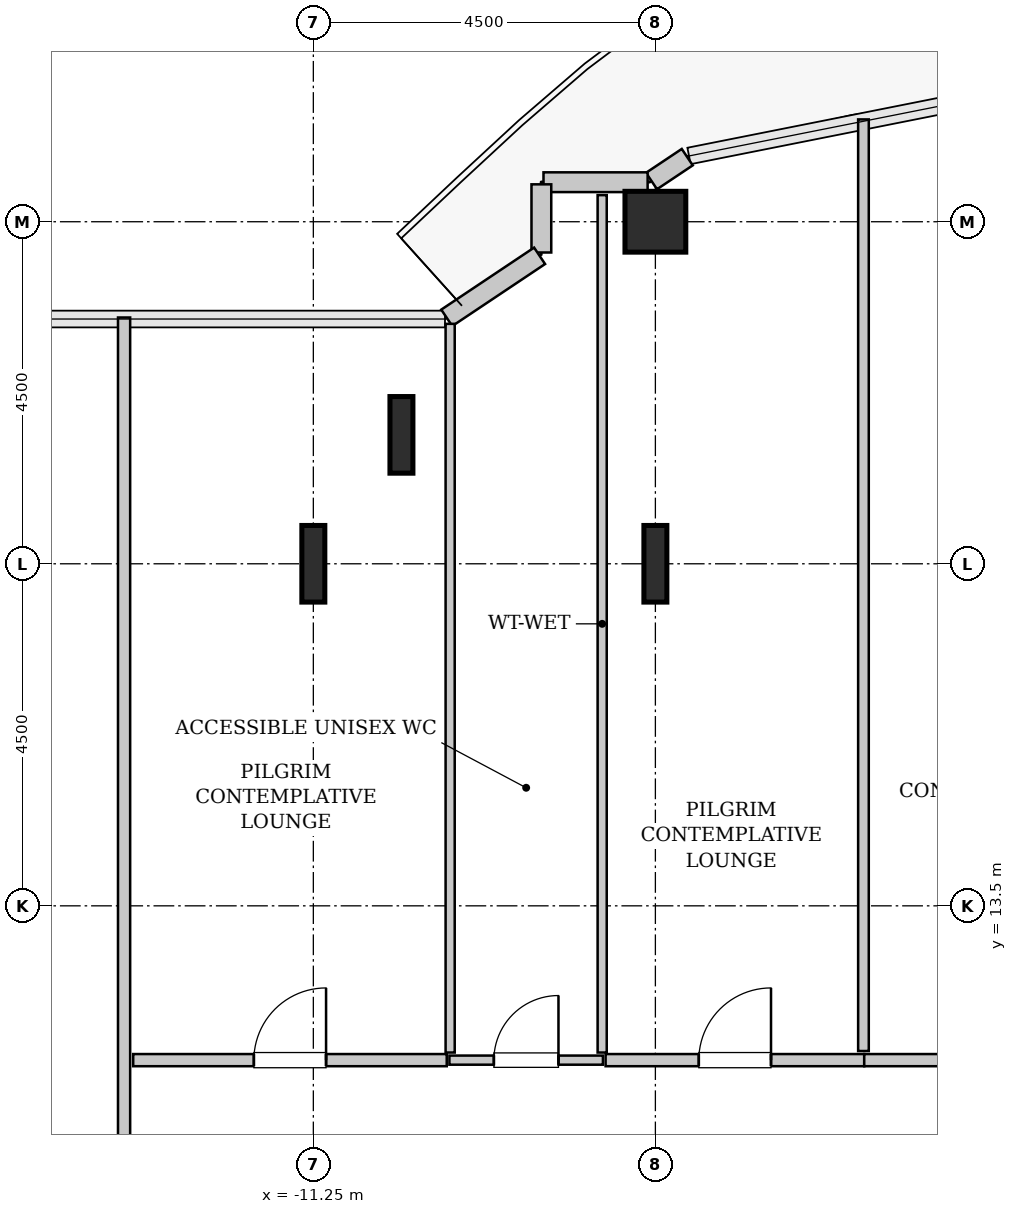
"""IFC4 building model, lengths in metres.
Left out: names, types, materials, properties, quantities, classifications, styles, units other than length and angle.
Written with IfcOpenShell. Run it as: python <this file> out.ifc"""

import sys

from ifc_helpers import new_model, si_unit, direction, frame, frame_2d, origin, origin_2d, place, context, subcontext, project, spatial, rectangle, hollow_rectangle, i_section, extrude, source, transform, mapped, element, fill, save


model = new_model("IFC4")
c1 = context("Model", 3, precision=1e-05, world=origin(), true_north=direction((0.0, 1.0)))
c2 = subcontext(c1, "Body", "Model", "MODEL_VIEW")
j1 = project(units=[si_unit("LENGTHUNIT", "METRE"), si_unit("PLANEANGLEUNIT", "RADIAN")], contexts=[c1])
p1 = place(None, origin())
s1 = spatial("IfcSite", under=j1, at=p1, CompositionType="ELEMENT")
p2 = place(p1, origin())
s2 = spatial("IfcBuilding", under=s1, at=p2, CompositionType="ELEMENT")
p3 = place(p2, frame((0.0, 0.0, 113.6)))
s3 = spatial("IfcBuildingStorey", under=s2, at=p3, CompositionType="ELEMENT", Elevation=113.6)
m1 = source(origin(), c2, "Body", "SweptSolid", [
    extrude(i_section(OverallWidth=0.302, OverallDepth=1.008, WebThickness=0.021, FlangeThickness=0.04, FilletRadius=0.03, at=origin_2d()), origin(), (0.0, 0.0, 1.0), 3.8),
])
for number, where, z_axis, x_axis in (
    (1, (-11.25, 18.0, 0.0), (0.0, 0.0, 1.0), (1.0, 0.0, 0.0)),
    (2, (-10.091, 19.696, 0.0), (0.0, 0.0, 1.0), (1.0, 0.0, 0.0)),
    (3, (-6.75, 18.0, 0.0), (0.0, 0.0, 1.0), (1.0, 0.0, 0.0)),
):
    element("IfcColumn", number, at=place(p3, frame(where, z_axis=z_axis, x_axis=x_axis)), inside=s3, PredefinedType="COLUMN", context=c2, shape_type="MappedRepresentation", body=[
        mapped(m1, transform((0.0, 0.0, 0.0), x_axis=(1.0, 0.0, 0.0), y_axis=(0.0, 1.0, 0.0), z_axis=(0.0, 0.0, 1.0), scale=1.0)),
    ])
m2 = source(origin(), c2, "Body", "SweptSolid", [
    extrude(hollow_rectangle(XDim=0.8, YDim=0.8, WallThickness=0.04, InnerFilletRadius=0.04, OuterFilletRadius=0.08, at=origin_2d()), origin(), (0.0, 0.0, 1.0), 3.8),
])
p4 = place(p3, frame((-6.75, 22.5, 0.0), z_axis=(0.0, 0.0, 1.0), x_axis=(1.0, 0.0, 0.0)))
e4 = element("IfcColumn", 4, at=p4, inside=s3, PredefinedType="COLUMN", context=c2, shape_type="MappedRepresentation", body=[
    mapped(m2, transform((0.0, 0.0, 0.0), x_axis=(1.0, 0.0, 0.0), y_axis=(0.0, 1.0, 0.0), z_axis=(0.0, 0.0, 1.0), scale=1.0)),
])
m3 = source(origin(), c2, "Body", "SweptSolid", [
    extrude(rectangle(XDim=0.565, YDim=0.26, at=frame_2d((0.283, 0.0))), origin(), (0.0, 0.0, 1.0), 3.55),
])
p5 = place(p3, frame((-6.331, 23.35, 0.0), z_axis=(0.0, 0.0, 1.0), x_axis=(-0.831651492666, -0.555297933317, 0.0)))
e5 = element("IfcWall", 5, at=p5, inside=s3, PredefinedType="SOLIDWALL", context=c2, shape_type="MappedRepresentation", body=[
    mapped(m3, transform((0.0, 0.0, 0.0), x_axis=(1.0, 0.0, 0.0), y_axis=(0.0, 1.0, 0.0), z_axis=(0.0, 0.0, 1.0), scale=1.0)),
])
m4 = source(origin(), c2, "Body", "SweptSolid", [
    extrude(rectangle(XDim=1.37, YDim=0.26, at=frame_2d((0.685, 0.0))), origin(), (0.0, 0.0, 1.0), 3.55),
])
p6 = place(p3, frame((-6.852, 23.02, 0.0), z_axis=(0.0, 0.0, 1.0), x_axis=(-1.0, 0.0, 0.0)))
e6 = element("IfcWall", 6, at=p6, inside=s3, PredefinedType="SOLIDWALL", context=c2, shape_type="MappedRepresentation", body=[
    mapped(m4, transform((0.0, 0.0, 0.0), x_axis=(1.0, 0.0, 0.0), y_axis=(0.0, 1.0, 0.0), z_axis=(0.0, 0.0, 1.0), scale=1.0)),
])
m5 = source(origin(), c2, "Body", "SweptSolid", [
    extrude(rectangle(XDim=0.897, YDim=0.26, at=frame_2d((0.448, 0.0))), origin(), (0.0, 0.0, 1.0), 3.55),
])
p7 = place(p3, frame((-8.25, 22.992, 0.0), z_axis=(0.0, 0.0, 1.0), x_axis=(0.0, -1.0, 0.0)))
e7 = element("IfcWall", 7, at=p7, inside=s3, PredefinedType="SOLIDWALL", context=c2, shape_type="MappedRepresentation", body=[
    mapped(m5, transform((0.0, 0.0, 0.0), x_axis=(1.0, 0.0, 0.0), y_axis=(0.0, 1.0, 0.0), z_axis=(0.0, 0.0, 1.0), scale=1.0)),
])
m6 = source(origin(), c2, "Body", "SweptSolid", [
    extrude(rectangle(XDim=1.469, YDim=0.26, at=frame_2d((0.734, 0.0))), origin(), (0.0, 0.0, 1.0), 3.55),
])
p8 = place(p3, frame((-8.273, 22.052, 0.0), z_axis=(0.0, 0.0, 1.0), x_axis=(-0.831461760506, -0.555581983884, 0.0)))
e8 = element("IfcWall", 8, at=p8, inside=s3, PredefinedType="SOLIDWALL", context=c2, shape_type="MappedRepresentation", body=[
    mapped(m6, transform((0.0, 0.0, 0.0), x_axis=(1.0, 0.0, 0.0), y_axis=(0.0, 1.0, 0.0), z_axis=(0.0, 0.0, 1.0), scale=1.0)),
])
m7 = source(origin(), c2, "Body", "SweptSolid", [
    extrude(rectangle(XDim=2.02, YDim=0.12, at=frame_2d((1.01, 0.0))), origin(), (0.0, 0.0, 1.0), 3.535),
])
p9 = place(p3, frame((-9.46, 11.47, 0.0), z_axis=(0.0, 0.0, 1.0), x_axis=(1.0, 0.0, 0.0)))
e9 = element("IfcWall", 9, at=p9, inside=s3, PredefinedType="PLUMBINGWALL", context=c2, shape_type="MappedRepresentation", body=[
    mapped(m7, transform((0.0, 0.0, 0.0), x_axis=(1.0, 0.0, 0.0), y_axis=(0.0, 1.0, 0.0), z_axis=(0.0, 0.0, 1.0), scale=1.0)),
])
p10 = place(p9, frame((0.585, 0.0, 0.0)))
e10 = element("IfcOpeningElement", 10, at=p10, cuts=e9, PredefinedType="OPENING", context=c2, shape_type="SweptSolid", body=[
    extrude(rectangle(XDim=0.85, YDim=2.1, at=frame_2d((0.425, 1.05))), frame((0.0, 0.07, 0.0), z_axis=(0.0, -1.0, 0.0), x_axis=(1.0, 0.0, 0.0)), (0.0, 0.0, 1.0), 0.14),
])
m8 = source(origin(), c2, "Body", "SweptSolid", [
    extrude(rectangle(XDim=11.28, YDim=0.12, at=frame_2d((5.64, 0.0))), origin(), (0.0, 0.0, 1.0), 3.535),
])
p11 = place(p3, frame((-7.45, 11.57, 0.0), z_axis=(0.0, 0.0, 1.0), x_axis=(0.0, 1.0, 0.0)))
e11 = element("IfcWall", 11, at=p11, inside=s3, PredefinedType="PLUMBINGWALL", context=c2, shape_type="MappedRepresentation", body=[
    mapped(m8, transform((0.0, 0.0, 0.0), x_axis=(1.0, 0.0, 0.0), y_axis=(0.0, 1.0, 0.0), z_axis=(0.0, 0.0, 1.0), scale=1.0)),
])
m9 = source(origin(), c2, "Body", "SweptSolid", [
    extrude(rectangle(XDim=9.587, YDim=0.12, at=frame_2d((4.793, 0.0))), origin(), (0.0, 0.0, 1.0), 3.535),
])
p12 = place(p3, frame((-9.45, 11.57, 0.0), z_axis=(0.0, 0.0, 1.0), x_axis=(0.0, 1.0, 0.0)))
e12 = element("IfcWall", 12, at=p12, inside=s3, PredefinedType="PLUMBINGWALL", context=c2, shape_type="MappedRepresentation", body=[
    mapped(m9, transform((0.0, 0.0, 0.0), x_axis=(1.0, 0.0, 0.0), y_axis=(0.0, 1.0, 0.0), z_axis=(0.0, 0.0, 1.0), scale=1.0)),
])
m10 = source(origin(), c2, "Body", "SweptSolid", [
    extrude(rectangle(XDim=12.745, YDim=0.16, at=frame_2d((6.373, 0.0))), origin(), (0.0, 0.0, 1.0), 3.535),
])
p13 = place(p3, frame((-13.74, 8.495, 0.0), z_axis=(0.0, 0.0, 1.0), x_axis=(0.0, 1.0, 0.0)))
e13 = element("IfcWall", 13, at=p13, inside=s3, PredefinedType="PARTITIONING", context=c2, shape_type="MappedRepresentation", body=[
    mapped(m10, transform((0.0, 0.0, 0.0), x_axis=(1.0, 0.0, 0.0), y_axis=(0.0, 1.0, 0.0), z_axis=(0.0, 0.0, 1.0), scale=1.0)),
])
p14 = place(p13, frame((1.032, 0.0, 0.0)))
e14 = element("IfcOpeningElement", 14, at=p14, cuts=e13, PredefinedType="OPENING", context=c2, shape_type="SweptSolid", body=[
    extrude(rectangle(XDim=0.95, YDim=2.1, at=frame_2d((0.475, 1.05))), frame((0.0, 0.09, 0.0), z_axis=(0.0, -1.0, 0.0), x_axis=(1.0, 0.0, 0.0)), (0.0, 0.0, 1.0), 0.18),
])
m11 = source(origin(), c2, "Body", "SweptSolid", [
    extrude(rectangle(XDim=4.125, YDim=0.16, at=frame_2d((2.062, 0.0))), origin(), (0.0, 0.0, 1.0), 3.535),
])
p15 = place(p3, frame((-13.62, 11.47, 0.0), z_axis=(0.0, 0.0, 1.0), x_axis=(1.0, 0.0, 0.0)))
e15 = element("IfcWall", 15, at=p15, inside=s3, PredefinedType="PARTITIONING", context=c2, shape_type="MappedRepresentation", body=[
    mapped(m11, transform((0.0, 0.0, 0.0), x_axis=(1.0, 0.0, 0.0), y_axis=(0.0, 1.0, 0.0), z_axis=(0.0, 0.0, 1.0), scale=1.0)),
])
p16 = place(p15, frame((1.587, 0.0, 0.0)))
e16 = element("IfcOpeningElement", 16, at=p16, cuts=e15, PredefinedType="OPENING", context=c2, shape_type="SweptSolid", body=[
    extrude(rectangle(XDim=0.95, YDim=2.1, at=frame_2d((0.475, 1.05))), frame((0.0, 0.09, 0.0), z_axis=(0.0, -1.0, 0.0), x_axis=(1.0, 0.0, 0.0)), (0.0, 0.0, 1.0), 0.18),
])
m12 = source(origin(), c2, "Body", "SweptSolid", [
    extrude(rectangle(XDim=3.403, YDim=0.16, at=frame_2d((1.701, 0.0))), origin(), (0.0, 0.0, 1.0), 3.535),
])
p17 = place(p3, frame((-7.405, 11.47, 0.0), z_axis=(0.0, 0.0, 1.0), x_axis=(1.0, 0.0, 0.0)))
e17 = element("IfcWall", 17, at=p17, inside=s3, PredefinedType="PARTITIONING", context=c2, shape_type="MappedRepresentation", body=[
    mapped(m12, transform((0.0, 0.0, 0.0), x_axis=(1.0, 0.0, 0.0), y_axis=(0.0, 1.0, 0.0), z_axis=(0.0, 0.0, 1.0), scale=1.0)),
])
p18 = place(p17, frame((1.226, 0.0, 0.0)))
e18 = element("IfcOpeningElement", 18, at=p18, cuts=e17, PredefinedType="OPENING", context=c2, shape_type="SweptSolid", body=[
    extrude(rectangle(XDim=0.95, YDim=2.1, at=frame_2d((0.475, 1.05))), frame((0.0, 0.09, 0.0), z_axis=(0.0, -1.0, 0.0), x_axis=(1.0, 0.0, 0.0)), (0.0, 0.0, 1.0), 0.18),
])
m13 = source(origin(), c2, "Body", "SweptSolid", [
    extrude(rectangle(XDim=12.256, YDim=0.14, at=frame_2d((6.128, 0.0))), origin(), (0.0, 0.0, 1.0), 3.535),
])
p19 = place(p3, frame((-4.012, 11.59, 0.0), z_axis=(0.0, 0.0, 1.0), x_axis=(0.0, 1.0, 0.0)))
e19 = element("IfcWall", 19, at=p19, inside=s3, PredefinedType="PARTITIONING", context=c2, shape_type="MappedRepresentation", body=[
    mapped(m13, transform((0.0, 0.0, 0.0), x_axis=(1.0, 0.0, 0.0), y_axis=(0.0, 1.0, 0.0), z_axis=(0.0, 0.0, 1.0), scale=1.0)),
])
m14 = source(origin(), c2, "Body", "SweptSolid", [
    extrude(rectangle(XDim=3.402, YDim=0.16, at=frame_2d((1.701, 0.0))), origin(), (0.0, 0.0, 1.0), 3.535),
])
p20 = place(p3, frame((-4.002, 11.47, 0.0), z_axis=(0.0, 0.0, 1.0), x_axis=(1.0, 0.0, 0.0)))
e20 = element("IfcWall", 20, at=p20, inside=s3, PredefinedType="PARTITIONING", context=c2, shape_type="MappedRepresentation", body=[
    mapped(m14, transform((0.0, 0.0, 0.0), x_axis=(1.0, 0.0, 0.0), y_axis=(0.0, 1.0, 0.0), z_axis=(0.0, 0.0, 1.0), scale=1.0)),
])
p21 = place(p20, frame((1.226, 0.0, 0.0)))
e21 = element("IfcOpeningElement", 21, at=p21, cuts=e20, PredefinedType="OPENING", context=c2, shape_type="SweptSolid", body=[
    extrude(rectangle(XDim=0.95, YDim=2.1, at=frame_2d((0.475, 1.05))), frame((0.0, 0.09, 0.0), z_axis=(0.0, -1.0, 0.0), x_axis=(1.0, 0.0, 0.0)), (0.0, 0.0, 1.0), 0.18),
])
m15 = source(origin(), c2, "Body", "SweptSolid", [
    extrude(rectangle(XDim=0.85, YDim=2.1, at=frame_2d((0.425, 1.05))), frame((0.0, 0.025, 0.0), z_axis=(0.0, -1.0, 0.0), x_axis=(1.0, 0.0, 0.0)), (0.0, 0.0, 1.0), 0.05),
])
p22 = place(p10, origin())
e22 = element("IfcDoor", 22, at=p22, inside=s3, OperationType="SINGLE_SWING_RIGHT", PredefinedType="DOOR", context=c2, shape_type="MappedRepresentation", body=[
    mapped(m15, transform((0.0, 0.0, 0.0), x_axis=(1.0, 0.0, 0.0), y_axis=(0.0, 1.0, 0.0), z_axis=(0.0, 0.0, 1.0), scale=1.0)),
])
fill(e10, e22)
m16 = source(origin(), c2, "Body", "SweptSolid", [
    extrude(rectangle(XDim=0.95, YDim=2.1, at=frame_2d((0.475, 1.05))), frame((0.0, 0.025, 0.0), z_axis=(0.0, -1.0, 0.0), x_axis=(1.0, 0.0, 0.0)), (0.0, 0.0, 1.0), 0.05),
])
p23 = place(p16, origin())
e23 = element("IfcDoor", 23, at=p23, inside=s3, OperationType="SINGLE_SWING_RIGHT", PredefinedType="DOOR", context=c2, shape_type="MappedRepresentation", body=[
    mapped(m16, transform((0.0, 0.0, 0.0), x_axis=(1.0, 0.0, 0.0), y_axis=(0.0, 1.0, 0.0), z_axis=(0.0, 0.0, 1.0), scale=1.0)),
])
fill(e16, e23)
p24 = place(p18, origin())
e24 = element("IfcDoor", 24, at=p24, inside=s3, OperationType="SINGLE_SWING_RIGHT", PredefinedType="DOOR", context=c2, shape_type="MappedRepresentation", body=[
    mapped(m16, transform((0.0, 0.0, 0.0), x_axis=(1.0, 0.0, 0.0), y_axis=(0.0, 1.0, 0.0), z_axis=(0.0, 0.0, 1.0), scale=1.0)),
])
fill(e18, e24)
save(model, sys.argv[1])
